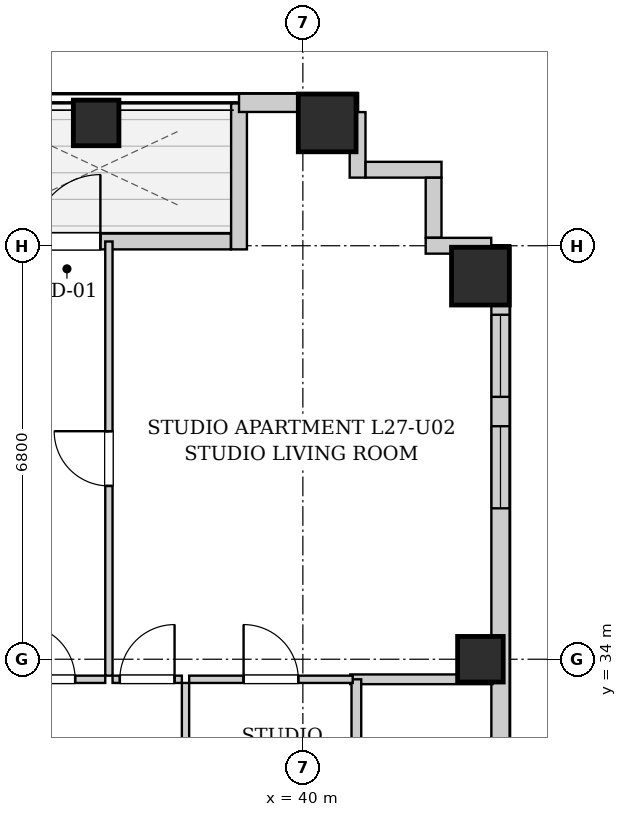
"""IFC4 building model, lengths in metres.
Left out: names, types, materials, properties, quantities, classifications, styles, units other than length and angle.
Written with IfcOpenShell. Run it as: python <this file> out.ifc"""

import sys

from ifc_helpers import new_model, si_unit, direction, frame, frame_2d, origin, origin_2d, place, context, subcontext, project, spatial, rectangle, extrude, element, fill, save


model = new_model("IFC4")
c1 = context("Model", 3, precision=1e-05, world=origin(), true_north=direction((0.0, 1.0)))
c2 = subcontext(c1, "Body", "Model", "MODEL_VIEW")
j1 = project(units=[si_unit("LENGTHUNIT", "METRE"), si_unit("PLANEANGLEUNIT", "RADIAN")], contexts=[c1])
p1 = place(None, origin())
s1 = spatial("IfcSite", under=j1, at=p1, CompositionType="ELEMENT")
p2 = place(p1, origin())
s2 = spatial("IfcBuilding", under=s1, at=p2, CompositionType="ELEMENT")
p3 = place(p2, frame((0.0, 0.0, 97.5)))
s3 = spatial("IfcBuildingStorey", under=s2, at=p3, CompositionType="ELEMENT", Elevation=97.5)
p4 = place(p3, frame((36.6, 42.82, 0.0), z_axis=(0.0, 0.0, 1.0), x_axis=(1.0, 0.0, 0.0)))
e1 = element("IfcColumn", 1, at=p4, inside=s3, PredefinedType="COLUMN", context=c2, shape_type="SweptSolid", body=[
    extrude(rectangle(XDim=0.75, YDim=0.75, at=origin_2d()), origin(), (0.0, 0.0, 1.0), 3.2),
])
p5 = place(p3, frame((40.4, 42.82, 0.0), z_axis=(0.0, 0.0, 1.0), x_axis=(1.0, 0.0, 0.0)))
e2 = element("IfcColumn", 2, at=p5, inside=s3, PredefinedType="COLUMN", context=c2, shape_type="SweptSolid", body=[
    extrude(rectangle(XDim=0.95, YDim=0.95, at=origin_2d()), origin(), (0.0, 0.0, 1.0), 3.2),
])
p6 = place(p3, frame((42.92, 34.0, 0.0), z_axis=(0.0, 0.0, 1.0), x_axis=(1.0, 0.0, 0.0)))
e3 = element("IfcColumn", 3, at=p6, inside=s3, PredefinedType="COLUMN", context=c2, shape_type="SweptSolid", body=[
    extrude(rectangle(XDim=0.75, YDim=0.75, at=origin_2d()), origin(), (0.0, 0.0, 1.0), 3.2),
])
p7 = place(p3, frame((42.92, 40.3, 0.0), z_axis=(0.0, 0.0, 1.0), x_axis=(1.0, 0.0, 0.0)))
e4 = element("IfcColumn", 4, at=p7, inside=s3, PredefinedType="COLUMN", context=c2, shape_type="SweptSolid", body=[
    extrude(rectangle(XDim=0.95, YDim=0.95, at=origin_2d()), origin(), (0.0, 0.0, 1.0), 3.2),
])
p8 = place(p3, frame((34.484, 40.87, 0.0), z_axis=(0.0, 0.0, 1.0), x_axis=(1.0, 0.0, 0.0)))
e5 = element("IfcWall", 5, at=p8, inside=s3, PredefinedType="SOLIDWALL", context=c2, shape_type="SweptSolid", body=[
    extrude(rectangle(XDim=4.332, YDim=0.26, at=frame_2d((2.166, 0.0))), origin(), (0.0, 0.0, 1.0), 2.94),
])
p9 = place(p8, frame((1.086, 0.0, 0.0)))
e6 = element("IfcOpeningElement", 6, at=p9, cuts=e5, PredefinedType="OPENING", context=c2, shape_type="SweptSolid", body=[
    extrude(rectangle(XDim=1.1, YDim=2.0, at=frame_2d((0.55, 1.0))), frame((0.0, 0.14, 0.0), z_axis=(0.0, -1.0, 0.0), x_axis=(1.0, 0.0, 0.0)), (0.0, 0.0, 1.0), 0.28),
])
p10 = place(p8, frame((0.246, 0.0, 0.55)))
e7 = element("IfcOpeningElement", 7, at=p10, cuts=e5, PredefinedType="OPENING", context=c2, shape_type="SweptSolid", body=[
    extrude(rectangle(XDim=0.68, YDim=1.2, at=frame_2d((0.34, 0.6))), frame((0.0, 0.14, 0.0), z_axis=(0.0, -1.0, 0.0), x_axis=(1.0, 0.0, 0.0)), (0.0, 0.0, 1.0), 0.28),
])
p11 = place(p3, frame((38.95, 40.74, 0.0), z_axis=(0.0, 0.0, 1.0), x_axis=(0.0, 1.0, 0.0)))
e8 = element("IfcWall", 8, at=p11, inside=s3, PredefinedType="SOLIDWALL", context=c2, shape_type="SweptSolid", body=[
    extrude(rectangle(XDim=2.4, YDim=0.26, at=frame_2d((1.2, 0.0))), origin(), (0.0, 0.0, 1.0), 2.94),
])
p12 = place(p3, frame((38.95, 43.15, 0.0), z_axis=(0.0, 0.0, 1.0), x_axis=(1.0, 0.0, 0.0)))
e9 = element("IfcWall", 9, at=p12, inside=s3, PredefinedType="SOLIDWALL", context=c2, shape_type="SweptSolid", body=[
    extrude(rectangle(XDim=1.95, YDim=0.3, at=frame_2d((0.975, 0.0))), origin(), (0.0, 0.0, 1.0), 2.94),
])
p13 = place(p3, frame((43.25, 40.8, 0.0), z_axis=(0.0, 0.0, 1.0), x_axis=(0.0, -1.0, 0.0)))
e10 = element("IfcWall", 10, at=p13, inside=s3, PredefinedType="SOLIDWALL", context=c2, shape_type="SweptSolid", body=[
    extrude(rectangle(XDim=12.6, YDim=0.3, at=frame_2d((6.3, 0.0))), origin(), (0.0, 0.0, 1.0), 2.94),
])
p14 = place(p13, frame((2.968, 0.0, 0.55)))
e11 = element("IfcOpeningElement", 11, at=p14, cuts=e10, PredefinedType="OPENING", context=c2, shape_type="SweptSolid", body=[
    extrude(rectangle(XDim=1.35, YDim=1.2, at=frame_2d((0.675, 0.6))), frame((0.0, 0.16, 0.0), z_axis=(0.0, -1.0, 0.0), x_axis=(1.0, 0.0, 0.0)), (0.0, 0.0, 1.0), 0.32),
])
p15 = place(p13, frame((1.135, 0.0, 0.55)))
e12 = element("IfcOpeningElement", 12, at=p15, cuts=e10, PredefinedType="OPENING", context=c2, shape_type="SweptSolid", body=[
    extrude(rectangle(XDim=1.35, YDim=1.2, at=frame_2d((0.675, 0.6))), frame((0.0, 0.16, 0.0), z_axis=(0.0, -1.0, 0.0), x_axis=(1.0, 0.0, 0.0)), (0.0, 0.0, 1.0), 0.32),
])
p16 = place(p3, frame((40.9, 42.998, 0.0), z_axis=(0.0, 0.0, 1.0), x_axis=(0.0, -1.0, 0.0)))
e13 = element("IfcWall", 13, at=p16, inside=s3, PredefinedType="SOLIDWALL", context=c2, shape_type="SweptSolid", body=[
    extrude(rectangle(XDim=1.078, YDim=0.26, at=frame_2d((0.539, 0.0))), origin(), (0.0, 0.0, 1.0), 2.94),
])
p17 = place(p3, frame((41.032, 42.05, 0.0), z_axis=(0.0, 0.0, 1.0), x_axis=(1.0, 0.0, 0.0)))
e14 = element("IfcWall", 14, at=p17, inside=s3, PredefinedType="SOLIDWALL", context=c2, shape_type="SweptSolid", body=[
    extrude(rectangle(XDim=1.248, YDim=0.26, at=frame_2d((0.624, 0.0))), origin(), (0.0, 0.0, 1.0), 2.94),
])
p18 = place(p3, frame((42.15, 41.918, 0.0), z_axis=(0.0, 0.0, 1.0), x_axis=(0.0, -1.0, 0.0)))
e15 = element("IfcWall", 15, at=p18, inside=s3, PredefinedType="SOLIDWALL", context=c2, shape_type="SweptSolid", body=[
    extrude(rectangle(XDim=0.986, YDim=0.26, at=frame_2d((0.493, 0.0))), origin(), (0.0, 0.0, 1.0), 2.94),
])
p19 = place(p3, frame((42.02, 40.8, 0.0), z_axis=(0.0, 0.0, 1.0), x_axis=(1.0, 0.0, 0.0)))
e16 = element("IfcWall", 16, at=p19, inside=s3, PredefinedType="SOLIDWALL", context=c2, shape_type="SweptSolid", body=[
    extrude(rectangle(XDim=1.078, YDim=0.26, at=frame_2d((0.539, 0.0))), origin(), (0.0, 0.0, 1.0), 2.94),
])
p20 = place(p3, frame((40.78, 33.67, 0.0), z_axis=(0.0, 0.0, 1.0), x_axis=(1.0, 0.0, 0.0)))
e17 = element("IfcWall", 17, at=p20, inside=s3, PredefinedType="PARTITIONING", context=c2, shape_type="SweptSolid", body=[
    extrude(rectangle(XDim=2.34, YDim=0.16, at=frame_2d((1.17, 0.0))), origin(), (0.0, 0.0, 1.0), 2.94),
])
p21 = place(p3, frame((40.88, 30.76, 0.0), z_axis=(0.0, 0.0, 1.0), x_axis=(0.0, 1.0, 0.0)))
e18 = element("IfcWall", 18, at=p21, inside=s3, PredefinedType="PARTITIONING", context=c2, shape_type="SweptSolid", body=[
    extrude(rectangle(XDim=2.91, YDim=0.16, at=frame_2d((1.455, 0.0))), origin(), (0.0, 0.0, 1.0), 2.94),
])
p22 = place(p3, frame((38.07, 30.76, 0.0), z_axis=(0.0, 0.0, 1.0), x_axis=(0.0, 1.0, 0.0)))
e19 = element("IfcWall", 19, at=p22, inside=s3, PredefinedType="PARTITIONING", context=c2, shape_type="SweptSolid", body=[
    extrude(rectangle(XDim=2.85, YDim=0.12, at=frame_2d((1.425, 0.0))), origin(), (0.0, 0.0, 1.0), 2.94),
])
p23 = place(p22, frame((0.975, 0.0, 0.0)))
e20 = element("IfcOpeningElement", 20, at=p23, cuts=e19, PredefinedType="OPENING", context=c2, shape_type="SweptSolid", body=[
    extrude(rectangle(XDim=0.9, YDim=2.05, at=frame_2d((0.45, 1.025))), frame((0.0, 0.07, 0.0), z_axis=(0.0, -1.0, 0.0), x_axis=(1.0, 0.0, 0.0)), (0.0, 0.0, 1.0), 0.14),
])
p24 = place(p3, frame((34.86, 33.67, 0.0), z_axis=(0.0, 0.0, 1.0), x_axis=(1.0, 0.0, 0.0)))
e21 = element("IfcWall", 21, at=p24, inside=s3, PredefinedType="PARTITIONING", context=c2, shape_type="SweptSolid", body=[
    extrude(rectangle(XDim=1.89, YDim=0.12, at=frame_2d((0.945, 0.0))), origin(), (0.0, 0.0, 1.0), 2.94),
])
p25 = place(p24, frame((0.495, 0.0, 0.0)))
e22 = element("IfcOpeningElement", 22, at=p25, cuts=e21, PredefinedType="OPENING", context=c2, shape_type="SweptSolid", body=[
    extrude(rectangle(XDim=0.9, YDim=2.05, at=frame_2d((0.45, 1.025))), frame((0.0, 0.07, 0.0), z_axis=(0.0, -1.0, 0.0), x_axis=(1.0, 0.0, 0.0)), (0.0, 0.0, 1.0), 0.14),
])
p26 = place(p3, frame((36.87, 33.67, 0.0), z_axis=(0.0, 0.0, 1.0), x_axis=(1.0, 0.0, 0.0)))
e23 = element("IfcWall", 23, at=p26, inside=s3, PredefinedType="PARTITIONING", context=c2, shape_type="SweptSolid", body=[
    extrude(rectangle(XDim=1.14, YDim=0.12, at=frame_2d((0.57, 0.0))), origin(), (0.0, 0.0, 1.0), 2.94),
])
p27 = place(p26, frame((0.12, 0.0, 0.0)))
e24 = element("IfcOpeningElement", 24, at=p27, cuts=e23, PredefinedType="OPENING", context=c2, shape_type="SweptSolid", body=[
    extrude(rectangle(XDim=0.9, YDim=2.05, at=frame_2d((0.45, 1.025))), frame((0.0, 0.07, 0.0), z_axis=(0.0, -1.0, 0.0), x_axis=(1.0, 0.0, 0.0)), (0.0, 0.0, 1.0), 0.14),
])
p28 = place(p3, frame((38.13, 33.67, 0.0), z_axis=(0.0, 0.0, 1.0), x_axis=(1.0, 0.0, 0.0)))
e25 = element("IfcWall", 25, at=p28, inside=s3, PredefinedType="PARTITIONING", context=c2, shape_type="SweptSolid", body=[
    extrude(rectangle(XDim=2.69, YDim=0.12, at=frame_2d((1.345, 0.0))), origin(), (0.0, 0.0, 1.0), 2.94),
])
p29 = place(p28, frame((0.895, 0.0, 0.0)))
e26 = element("IfcOpeningElement", 26, at=p29, cuts=e25, PredefinedType="OPENING", context=c2, shape_type="SweptSolid", body=[
    extrude(rectangle(XDim=0.9, YDim=2.05, at=frame_2d((0.45, 1.025))), frame((0.0, 0.07, 0.0), z_axis=(0.0, -1.0, 0.0), x_axis=(1.0, 0.0, 0.0)), (0.0, 0.0, 1.0), 0.14),
])
p30 = place(p3, frame((36.81, 33.73, 0.0), z_axis=(0.0, 0.0, 1.0), x_axis=(0.0, 1.0, 0.0)))
e27 = element("IfcWall", 27, at=p30, inside=s3, PredefinedType="PARTITIONING", context=c2, shape_type="SweptSolid", body=[
    extrude(rectangle(XDim=7.14, YDim=0.12, at=frame_2d((3.57, 0.0))), origin(), (0.0, 0.0, 1.0), 2.94),
])
p31 = place(p30, frame((3.12, 0.0, 0.0)))
e28 = element("IfcOpeningElement", 28, at=p31, cuts=e27, PredefinedType="OPENING", context=c2, shape_type="SweptSolid", body=[
    extrude(rectangle(XDim=0.9, YDim=2.05, at=frame_2d((0.45, 1.025))), frame((0.0, 0.07, 0.0), z_axis=(0.0, -1.0, 0.0), x_axis=(1.0, 0.0, 0.0)), (0.0, 0.0, 1.0), 0.14),
])
p32 = place(p25, origin())
e29 = element("IfcDoor", 29, at=p32, inside=s3, OperationType="SINGLE_SWING_LEFT", PredefinedType="DOOR", context=c2, shape_type="SweptSolid", body=[
    extrude(rectangle(XDim=0.9, YDim=2.05, at=frame_2d((0.45, 1.025))), frame((0.0, 0.025, 0.0), z_axis=(0.0, -1.0, 0.0), x_axis=(1.0, 0.0, 0.0)), (0.0, 0.0, 1.0), 0.05),
])
fill(e22, e29)
p33 = place(p27, origin())
e30 = element("IfcDoor", 30, at=p33, inside=s3, OperationType="SINGLE_SWING_RIGHT", PredefinedType="DOOR", context=c2, shape_type="SweptSolid", body=[
    extrude(rectangle(XDim=0.9, YDim=2.05, at=frame_2d((0.45, 1.025))), frame((0.0, 0.025, 0.0), z_axis=(0.0, -1.0, 0.0), x_axis=(1.0, 0.0, 0.0)), (0.0, 0.0, 1.0), 0.05),
])
fill(e24, e30)
p34 = place(p29, origin())
e31 = element("IfcDoor", 31, at=p34, inside=s3, OperationType="SINGLE_SWING_LEFT", PredefinedType="DOOR", context=c2, shape_type="SweptSolid", body=[
    extrude(rectangle(XDim=0.9, YDim=2.05, at=frame_2d((0.45, 1.025))), frame((0.0, 0.025, 0.0), z_axis=(0.0, -1.0, 0.0), x_axis=(1.0, 0.0, 0.0)), (0.0, 0.0, 1.0), 0.05),
])
fill(e26, e31)
p35 = place(p31, origin())
e32 = element("IfcDoor", 32, at=p35, inside=s3, OperationType="SINGLE_SWING_RIGHT", PredefinedType="DOOR", context=c2, shape_type="SweptSolid", body=[
    extrude(rectangle(XDim=0.9, YDim=2.05, at=frame_2d((0.45, 1.025))), frame((0.0, 0.025, 0.0), z_axis=(0.0, -1.0, 0.0), x_axis=(1.0, 0.0, 0.0)), (0.0, 0.0, 1.0), 0.05),
])
fill(e28, e32)
p36 = place(p9, origin())
e33 = element("IfcDoor", 33, at=p36, inside=s3, OperationType="SINGLE_SWING_RIGHT", PredefinedType="DOOR", context=c2, shape_type="SweptSolid", body=[
    extrude(rectangle(XDim=1.1, YDim=2.0, at=frame_2d((0.55, 1.0))), frame((0.0, 0.025, 0.0), z_axis=(0.0, -1.0, 0.0), x_axis=(1.0, 0.0, 0.0)), (0.0, 0.0, 1.0), 0.05),
])
fill(e6, e33)
p37 = place(p14, origin())
e34 = element("IfcWindow", 34, at=p37, inside=s3, PartitioningType="SINGLE_PANEL", PredefinedType="WINDOW", context=c2, shape_type="SweptSolid", body=[
    extrude(rectangle(XDim=1.35, YDim=1.2, at=frame_2d((0.675, 0.6))), frame((0.0, 0.03, 0.0), z_axis=(0.0, -1.0, 0.0), x_axis=(1.0, 0.0, 0.0)), (0.0, 0.0, 1.0), 0.06),
])
fill(e11, e34)
p38 = place(p15, origin())
e35 = element("IfcWindow", 35, at=p38, inside=s3, PartitioningType="SINGLE_PANEL", PredefinedType="WINDOW", context=c2, shape_type="SweptSolid", body=[
    extrude(rectangle(XDim=1.35, YDim=1.2, at=frame_2d((0.675, 0.6))), frame((0.0, 0.03, 0.0), z_axis=(0.0, -1.0, 0.0), x_axis=(1.0, 0.0, 0.0)), (0.0, 0.0, 1.0), 0.06),
])
fill(e12, e35)
save(model, sys.argv[1])
